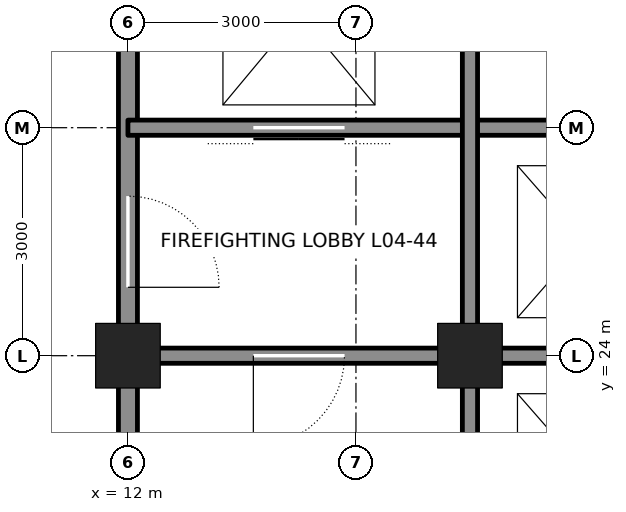
"""IFC4 building model, lengths in metres.
Left out: names, types, materials, properties, quantities, classifications, styles, units other than length and angle.
Written with IfcOpenShell. Run it as: python <this file> out.ifc"""

import sys

from ifc_helpers import new_model, si_unit, direction, frame, frame_2d, origin, origin_2d, place, context, subcontext, project, spatial, rectangle, hollow_rectangle, extrude, element, fill, save


model = new_model("IFC4")
c1 = context("Model", 3, precision=1e-05, world=origin(), true_north=direction((0.0, 1.0)))
c2 = subcontext(c1, "Body", "Model", "MODEL_VIEW")
j1 = project(units=[si_unit("LENGTHUNIT", "METRE"), si_unit("PLANEANGLEUNIT", "RADIAN")], contexts=[c1])
p1 = place(None, origin())
s1 = spatial("IfcSite", under=j1, at=p1, CompositionType="ELEMENT")
p2 = place(p1, origin())
s2 = spatial("IfcBuilding", under=s1, at=p2, CompositionType="ELEMENT")
p3 = place(p2, frame((0.0, 0.0, 24.3)))
s3 = spatial("IfcBuildingStorey", under=s2, at=p3, CompositionType="ELEMENT", Elevation=24.3)
for number, where, z_axis, x_axis in (
    (1, (12.0, 24.0, 0.0), (0.0, 0.0, 1.0), (1.0, 0.0, 0.0)),
    (2, (16.5, 24.0, 0.0), (0.0, 0.0, 1.0), (1.0, 0.0, 0.0)),
):
    element("IfcColumn", number, at=place(p3, frame(where, z_axis=z_axis, x_axis=x_axis)), inside=s3, PredefinedType="COLUMN", context=c2, shape_type="SweptSolid", body=[
        extrude(hollow_rectangle(XDim=0.85, YDim=0.85, WallThickness=0.085, at=origin_2d()), origin(), (0.0, 0.0, 1.0), 4.5),
    ])
p4 = place(p3, frame((12.0, 21.25, 0.0), z_axis=(0.0, 0.0, 1.0), x_axis=(0.0, 1.0, 0.0)))
e3 = element("IfcWall", 3, at=p4, inside=s3, PredefinedType="SOLIDWALL", context=c2, shape_type="SweptSolid", body=[
    extrude(rectangle(XDim=2.5, YDim=0.25, at=frame_2d((1.25, 0.0))), origin(), (0.0, 0.0, 1.0), 3.113),
])
p5 = place(p3, frame((12.0, 24.25, 0.0), z_axis=(0.0, 0.0, 1.0), x_axis=(0.0, 1.0, 0.0)))
e4 = element("IfcWall", 4, at=p5, inside=s3, PredefinedType="SOLIDWALL", context=c2, shape_type="SweptSolid", body=[
    extrude(rectangle(XDim=8.5, YDim=0.25, at=frame_2d((4.25, 0.0))), origin(), (0.0, 0.0, 1.0), 3.113),
])
p6 = place(p5, frame((0.65, 0.0, 0.0)))
e5 = element("IfcOpeningElement", 5, at=p6, cuts=e4, PredefinedType="OPENING", context=c2, shape_type="SweptSolid", body=[
    extrude(rectangle(XDim=1.2, YDim=2.1, at=frame_2d((0.6, 1.05))), frame((0.0, 0.135, 0.0), z_axis=(0.0, -1.0, 0.0), x_axis=(1.0, 0.0, 0.0)), (0.0, 0.0, 1.0), 0.27),
])
p7 = place(p5, frame((6.875, 0.0, 0.0)))
e6 = element("IfcOpeningElement", 6, at=p7, cuts=e4, PredefinedType="OPENING", context=c2, shape_type="SweptSolid", body=[
    extrude(rectangle(XDim=0.75, YDim=2.1, at=frame_2d((0.375, 1.05))), frame((0.0, 0.135, 0.0), z_axis=(0.0, -1.0, 0.0), x_axis=(1.0, 0.0, 0.0)), (0.0, 0.0, 1.0), 0.27),
])
p8 = place(p3, frame((12.25, 24.0, 0.0), z_axis=(0.0, 0.0, 1.0), x_axis=(1.0, 0.0, 0.0)))
e7 = element("IfcWall", 7, at=p8, inside=s3, PredefinedType="SOLIDWALL", context=c2, shape_type="SweptSolid", body=[
    extrude(rectangle(XDim=4.0, YDim=0.2, at=frame_2d((2.0, 0.0))), origin(), (0.0, 0.0, 1.0), 3.39),
])
p9 = place(p8, frame((1.4, 0.0, 0.0)))
e8 = element("IfcOpeningElement", 8, at=p9, cuts=e7, PredefinedType="OPENING", context=c2, shape_type="SweptSolid", body=[
    extrude(rectangle(XDim=1.2, YDim=2.1, at=frame_2d((0.6, 1.05))), frame((0.0, 0.11, 0.0), z_axis=(0.0, -1.0, 0.0), x_axis=(1.0, 0.0, 0.0)), (0.0, 0.0, 1.0), 0.22),
])
p10 = place(p3, frame((16.75, 24.0, 0.0), z_axis=(0.0, 0.0, 1.0), x_axis=(1.0, 0.0, 0.0)))
e9 = element("IfcWall", 9, at=p10, inside=s3, PredefinedType="SOLIDWALL", context=c2, shape_type="SweptSolid", body=[
    extrude(rectangle(XDim=2.75, YDim=0.2, at=frame_2d((1.375, 0.0))), origin(), (0.0, 0.0, 1.0), 3.39),
])
p11 = place(p3, frame((12.0, 27.0, 0.0), z_axis=(0.0, 0.0, 1.0), x_axis=(1.0, 0.0, 0.0)))
e10 = element("IfcWall", 10, at=p11, inside=s3, PredefinedType="SOLIDWALL", context=c2, shape_type="SweptSolid", body=[
    extrude(rectangle(XDim=7.5, YDim=0.2, at=frame_2d((3.75, 0.0))), origin(), (0.0, 0.0, 1.0), 4.34),
])
p12 = place(p11, frame((1.65, 0.0, 0.0)))
e11 = element("IfcOpeningElement", 11, at=p12, cuts=e10, PredefinedType="OPENING", context=c2, shape_type="SweptSolid", body=[
    extrude(rectangle(XDim=1.2, YDim=2.1, at=frame_2d((0.6, 1.05))), frame((0.0, 0.11, 0.0), z_axis=(0.0, -1.0, 0.0), x_axis=(1.0, 0.0, 0.0)), (0.0, 0.0, 1.0), 0.22),
])
p13 = place(p3, frame((16.5, 21.25, 0.0), z_axis=(0.0, 0.0, 1.0), x_axis=(0.0, 1.0, 0.0)))
e12 = element("IfcWall", 12, at=p13, inside=s3, PredefinedType="SOLIDWALL", context=c2, shape_type="SweptSolid", body=[
    extrude(rectangle(XDim=2.5, YDim=0.2, at=frame_2d((1.25, 0.0))), origin(), (0.0, 0.0, 1.0), 3.413),
])
p14 = place(p3, frame((16.5, 24.25, 0.0), z_axis=(0.0, 0.0, 1.0), x_axis=(0.0, 1.0, 0.0)))
e13 = element("IfcWall", 13, at=p14, inside=s3, PredefinedType="SOLIDWALL", context=c2, shape_type="SweptSolid", body=[
    extrude(rectangle(XDim=8.5, YDim=0.2, at=frame_2d((4.25, 0.0))), origin(), (0.0, 0.0, 1.0), 3.413),
])
p15 = place(p9, frame((1.2, 0.0, 0.0), z_axis=(0.0, 0.0, 1.0), x_axis=(-1.0, 0.0, 0.0)))
e14 = element("IfcDoor", 14, at=p15, inside=s3, OperationType="SINGLE_SWING_RIGHT", PredefinedType="DOOR", context=c2, shape_type="SweptSolid", body=[
    extrude(rectangle(XDim=1.2, YDim=2.1, at=frame_2d((0.6, 1.05))), frame((0.0, 0.025, 0.0), z_axis=(0.0, -1.0, 0.0), x_axis=(1.0, 0.0, 0.0)), (0.0, 0.0, 1.0), 0.05),
])
fill(e8, e14)
p16 = place(p6, frame((1.2, 0.0, 0.0), z_axis=(0.0, 0.0, 1.0), x_axis=(-1.0, 0.0, 0.0)))
e15 = element("IfcDoor", 15, at=p16, inside=s3, OperationType="SINGLE_SWING_RIGHT", PredefinedType="DOOR", context=c2, shape_type="SweptSolid", body=[
    extrude(rectangle(XDim=1.2, YDim=2.1, at=frame_2d((0.6, 1.05))), frame((0.0, 0.025, 0.0), z_axis=(0.0, -1.0, 0.0), x_axis=(1.0, 0.0, 0.0)), (0.0, 0.0, 1.0), 0.05),
])
fill(e5, e15)
p17 = place(p12, origin())
e16 = element("IfcDoor", 16, at=p17, inside=s3, OperationType="DOUBLE_DOOR_SLIDING", PredefinedType="DOOR", context=c2, shape_type="SweptSolid", body=[
    extrude(rectangle(XDim=1.2, YDim=2.1, at=frame_2d((0.6, 1.05))), frame((0.0, 0.025, 0.0), z_axis=(0.0, -1.0, 0.0), x_axis=(1.0, 0.0, 0.0)), (0.0, 0.0, 1.0), 0.05),
])
fill(e11, e16)
save(model, sys.argv[1])
